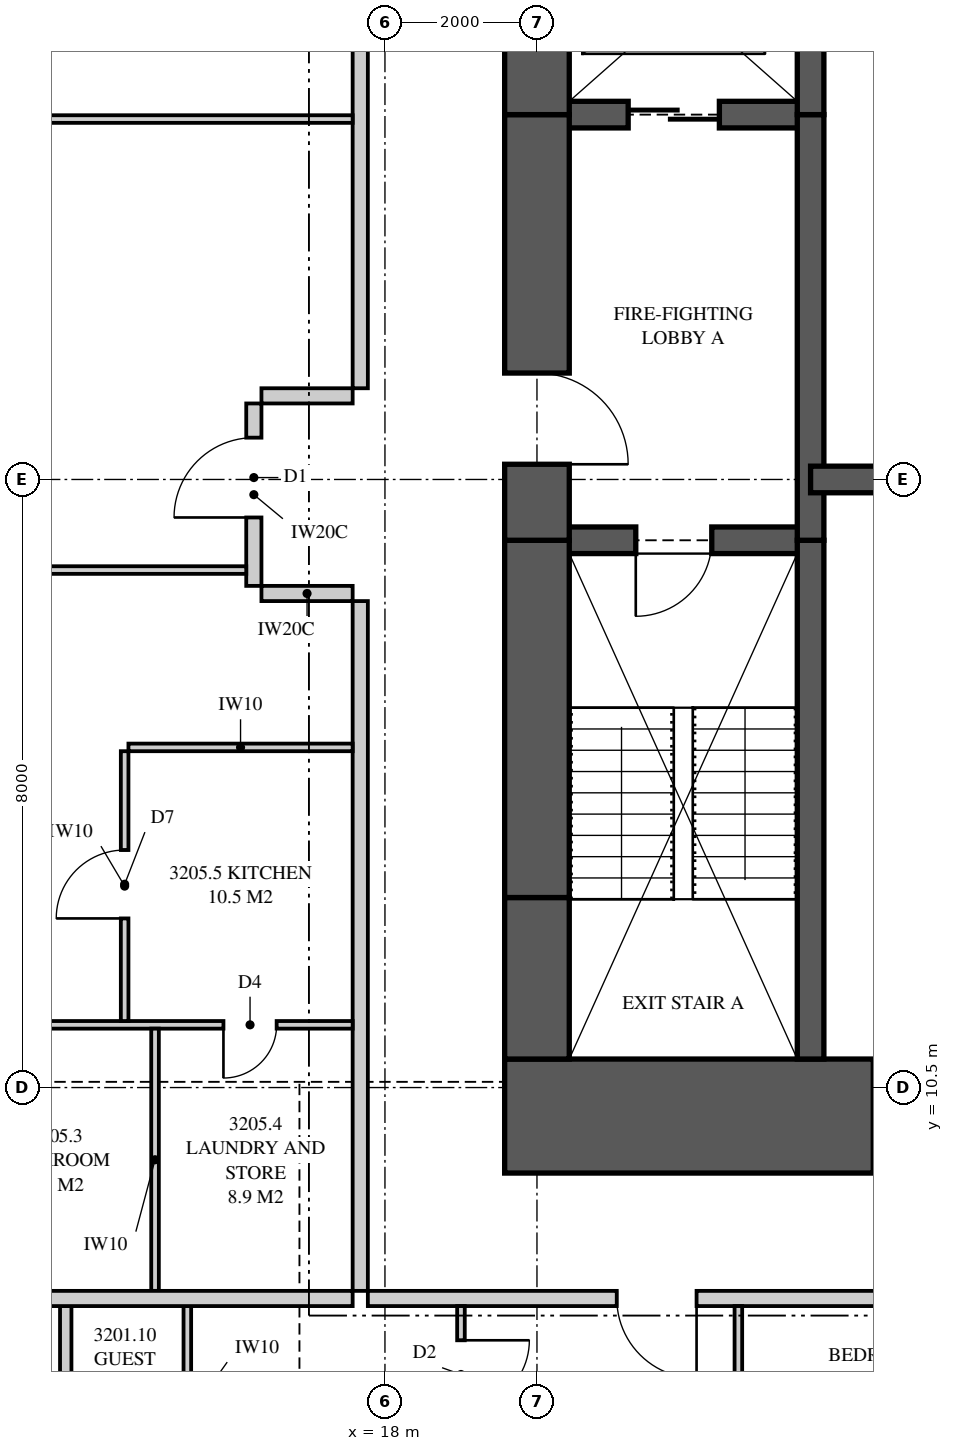
"""IFC4 building model, lengths in metres.
Left out: names, types, materials, properties, quantities, classifications, styles, units other than length and angle.
Written with IfcOpenShell. Run it as: python <this file> out.ifc"""

import sys

from ifc_helpers import new_model, si_unit, direction, frame, frame_2d, origin, place, context, subcontext, project, spatial, polyline, rectangle, outline, extrude, element, fill, save


model = new_model("IFC4")
c1 = context("Model", 3, precision=1e-05, world=origin(), true_north=direction((0.0, 1.0)))
c2 = subcontext(c1, "Body", "Model", "MODEL_VIEW")
j1 = project(units=[si_unit("LENGTHUNIT", "METRE"), si_unit("PLANEANGLEUNIT", "RADIAN")], contexts=[c1])
p1 = place(None, origin())
s1 = spatial("IfcSite", under=j1, at=p1, CompositionType="ELEMENT")
p2 = place(p1, origin())
s2 = spatial("IfcBuilding", under=s1, at=p2, CompositionType="ELEMENT")
p3 = place(p2, frame((0.0, 0.0, 118.25)))
s3 = spatial("IfcBuildingStorey", under=s2, at=p3, CompositionType="ELEMENT", Elevation=118.25)
p4 = place(p3, frame((19.575, 10.125, 0.0), z_axis=(0.0, 0.0, 1.0), x_axis=(1.0, 0.0, 0.0)))
e1 = element("IfcWall", 1, at=p4, inside=s3, PredefinedType="SHEAR", context=c2, shape_type="SweptSolid", body=[
    extrude(rectangle(XDim=6.425, YDim=1.5, at=frame_2d((3.212, 0.0))), origin(), (0.0, 0.0, 1.0), 3.35),
])
p5 = place(p4, frame((4.85, 0.0, 0.0)))
e2 = element("IfcOpeningElement", 2, at=p5, cuts=e1, PredefinedType="OPENING", context=c2, shape_type="SweptSolid", body=[
    extrude(rectangle(XDim=0.75, YDim=2.1, at=frame_2d((0.375, 1.05))), frame((0.0, 0.76, 0.0), z_axis=(0.0, -1.0, 0.0), x_axis=(1.0, 0.0, 0.0)), (0.0, 0.0, 1.0), 1.52),
])
p6 = place(p3, frame((20.0, 26.125, 0.0), z_axis=(0.0, 0.0, 1.0), x_axis=(0.0, -1.0, 0.0)))
e3 = element("IfcWall", 3, at=p6, inside=s3, PredefinedType="SHEAR", context=c2, shape_type="SweptSolid", body=[
    extrude(rectangle(XDim=2.825, YDim=0.85, at=frame_2d((1.413, 0.0))), origin(), (0.0, 0.0, 1.0), 3.35),
])
p7 = place(p3, frame((20.0, 23.3, 0.0), z_axis=(0.0, 0.0, 1.0), x_axis=(0.0, -1.0, 0.0)))
e4 = element("IfcWall", 4, at=p7, inside=s3, PredefinedType="SHEAR", context=c2, shape_type="SweptSolid", body=[
    extrude(rectangle(XDim=5.6, YDim=0.85, at=frame_2d((2.8, 0.0))), origin(), (0.0, 0.0, 1.0), 3.35),
])
p8 = place(p7, frame((3.4, 0.0, 0.0)))
e5 = element("IfcOpeningElement", 5, at=p8, cuts=e4, PredefinedType="OPENING", context=c2, shape_type="SweptSolid", body=[
    extrude(rectangle(XDim=1.2, YDim=2.2, at=frame_2d((0.6, 1.1))), frame((0.0, 0.435, 0.0), z_axis=(0.0, -1.0, 0.0), x_axis=(1.0, 0.0, 0.0)), (0.0, 0.0, 1.0), 0.87),
])
p9 = place(p3, frame((20.0, 17.7, 0.0), z_axis=(0.0, 0.0, 1.0), x_axis=(0.0, -1.0, 0.0)))
e6 = element("IfcWall", 6, at=p9, inside=s3, PredefinedType="SHEAR", context=c2, shape_type="SweptSolid", body=[
    extrude(rectangle(XDim=4.7, YDim=0.85, at=frame_2d((2.35, 0.0))), origin(), (0.0, 0.0, 1.0), 3.35),
])
p10 = place(p3, frame((20.0, 13.0, 0.0), z_axis=(0.0, 0.0, 1.0), x_axis=(0.0, -1.0, 0.0)))
e7 = element("IfcWall", 7, at=p10, inside=s3, PredefinedType="SHEAR", context=c2, shape_type="SweptSolid", body=[
    extrude(rectangle(XDim=2.125, YDim=0.85, at=frame_2d((1.062, 0.0))), origin(), (0.0, 0.0, 1.0), 3.35),
])
p11 = place(p3, frame((23.6, 10.875, 0.0), z_axis=(0.0, 0.0, 1.0), x_axis=(0.0, 1.0, 0.0)))
e8 = element("IfcWall", 8, at=p11, inside=s3, PredefinedType="SHEAR", context=c2, shape_type="SweptSolid", body=[
    extrude(rectangle(XDim=6.825, YDim=0.35, at=frame_2d((3.413, 0.0))), origin(), (0.0, 0.0, 1.0), 3.35),
])
p12 = place(p3, frame((23.6, 17.7, 0.0), z_axis=(0.0, 0.0, 1.0), x_axis=(0.0, 1.0, 0.0)))
e9 = element("IfcWall", 9, at=p12, inside=s3, PredefinedType="SHEAR", context=c2, shape_type="SweptSolid", body=[
    extrude(rectangle(XDim=5.6, YDim=0.35, at=frame_2d((2.8, 0.0))), origin(), (0.0, 0.0, 1.0), 3.35),
])
p13 = place(p3, frame((23.6, 23.3, 0.0), z_axis=(0.0, 0.0, 1.0), x_axis=(0.0, 1.0, 0.0)))
e10 = element("IfcWall", 10, at=p13, inside=s3, PredefinedType="SHEAR", context=c2, shape_type="SweptSolid", body=[
    extrude(rectangle(XDim=2.825, YDim=0.35, at=frame_2d((1.413, 0.0))), origin(), (0.0, 0.0, 1.0), 3.35),
])
p14 = place(p3, frame((20.0, 17.7, 0.0), z_axis=(0.0, 0.0, 1.0), x_axis=(1.0, 0.0, 0.0)))
e11 = element("IfcWall", 11, at=p14, inside=s3, PredefinedType="SHEAR", context=c2, shape_type="SweptSolid", body=[
    extrude(rectangle(XDim=3.6, YDim=0.35, at=frame_2d((1.8, 0.0))), origin(), (0.0, 0.0, 1.0), 3.35),
])
p15 = place(p14, frame((1.3, 0.0, 0.0)))
e12 = element("IfcOpeningElement", 12, at=p15, cuts=e11, PredefinedType="OPENING", context=c2, shape_type="SweptSolid", body=[
    extrude(rectangle(XDim=1.0, YDim=2.1, at=frame_2d((0.5, 1.05))), frame((0.0, 0.185, 0.0), z_axis=(0.0, -1.0, 0.0), x_axis=(1.0, 0.0, 0.0)), (0.0, 0.0, 1.0), 0.37),
])
p16 = place(p3, frame((20.0, 23.3, 0.0), z_axis=(0.0, 0.0, 1.0), x_axis=(1.0, 0.0, 0.0)))
e13 = element("IfcWall", 13, at=p16, inside=s3, PredefinedType="SHEAR", context=c2, shape_type="SweptSolid", body=[
    extrude(rectangle(XDim=3.6, YDim=0.35, at=frame_2d((1.8, 0.0))), origin(), (0.0, 0.0, 1.0), 3.35),
])
p17 = place(p16, frame((1.2, 0.0, 0.0)))
e14 = element("IfcOpeningElement", 14, at=p17, cuts=e13, PredefinedType="OPENING", context=c2, shape_type="SweptSolid", body=[
    extrude(rectangle(XDim=1.2, YDim=2.1, at=frame_2d((0.6, 1.05))), frame((0.0, 0.185, 0.0), z_axis=(0.0, -1.0, 0.0), x_axis=(1.0, 0.0, 0.0)), (0.0, 0.0, 1.0), 0.37),
])
p18 = place(p3, frame((23.6, 18.5, 0.0), z_axis=(0.0, 0.0, 1.0), x_axis=(1.0, 0.0, 0.0)))
e15 = element("IfcWall", 15, at=p18, inside=s3, PredefinedType="SHEAR", context=c2, shape_type="SweptSolid", body=[
    extrude(rectangle(XDim=2.4, YDim=0.35, at=frame_2d((1.2, 0.0))), origin(), (0.0, 0.0, 1.0), 3.35),
])
p19 = place(p3, frame((17.775, 7.725, 0.0), z_axis=(0.0, 0.0, 1.0), x_axis=(1.0, 0.0, 0.0)))
e16 = element("IfcWall", 16, at=p19, inside=s3, PredefinedType="PARTITIONING", context=c2, shape_type="SweptSolid", body=[
    extrude(outline(polyline([(0.0, 0.0), (19.225, 0.0), (19.225, 3.11), (10.312, 3.11), (10.312, 2.541), (9.638, 2.541), (9.638, 3.11), (0.0, 3.11), (0.0, 0.0)])), frame((0.0, 0.1, 0.0), z_axis=(0.0, -1.0, 0.0), x_axis=(1.0, 0.0, 0.0)), (0.0, 0.0, 1.0), 0.2),
])
p20 = place(p19, frame((3.275, 0.0, 0.0)))
e17 = element("IfcOpeningElement", 17, at=p20, cuts=e16, PredefinedType="OPENING", context=c2, shape_type="SweptSolid", body=[
    extrude(rectangle(XDim=1.05, YDim=2.2, at=frame_2d((0.525, 1.1))), frame((0.0, 0.11, 0.0), z_axis=(0.0, -1.0, 0.0), x_axis=(1.0, 0.0, 0.0)), (0.0, 0.0, 1.0), 0.22),
])
p21 = place(p3, frame((22.65, 0.175, 0.0), z_axis=(0.0, 0.0, 1.0), x_axis=(0.0, 1.0, 0.0)))
e18 = element("IfcWall", 18, at=p21, inside=s3, PredefinedType="PARTITIONING", context=c2, shape_type="SweptSolid", body=[
    extrude(outline(polyline([(0.0, 0.0), (7.45, 0.0), (7.45, 3.11), (1.635, 3.11), (1.635, 2.15), (0.0, 2.15), (0.0, 3.11), (0.0, 0.0)])), frame((0.0, 0.05, 0.0), z_axis=(0.0, -1.0, 0.0), x_axis=(1.0, 0.0, 0.0)), (0.0, 0.0, 1.0), 0.1),
])
p22 = place(p21, frame((3.6, 0.0, 0.0)))
e19 = element("IfcOpeningElement", 19, at=p22, cuts=e18, PredefinedType="OPENING", context=c2, shape_type="SweptSolid", body=[
    extrude(rectangle(XDim=0.9, YDim=2.1, at=frame_2d((0.45, 1.05))), frame((0.0, 0.06, 0.0), z_axis=(0.0, -1.0, 0.0), x_axis=(1.0, 0.0, 0.0)), (0.0, 0.0, 1.0), 0.12),
])
p23 = place(p3, frame((19.0, 0.175, 0.0), z_axis=(0.0, 0.0, 1.0), x_axis=(0.0, 1.0, 0.0)))
e20 = element("IfcWall", 20, at=p23, inside=s3, PredefinedType="PARTITIONING", context=c2, shape_type="SweptSolid", body=[
    extrude(outline(polyline([(0.529, 2.15), (0.0, 2.15), (0.0, 0.0), (0.529, 0.0), (0.529, 0.017), (1.021, 0.017), (1.021, 0.0), (7.45, 0.0), (7.45, 3.11), (1.635, 3.11), (1.635, 2.15), (1.021, 2.15), (1.021, 2.133), (0.529, 2.133), (0.529, 2.15)])), frame((0.0, 0.05, 0.0), z_axis=(0.0, -1.0, 0.0), x_axis=(1.0, 0.0, 0.0)), (0.0, 0.0, 1.0), 0.1),
])
p24 = place(p23, frame((6.1, 0.0, 0.0)))
e21 = element("IfcOpeningElement", 21, at=p24, cuts=e20, PredefinedType="OPENING", context=c2, shape_type="SweptSolid", body=[
    extrude(rectangle(XDim=0.9, YDim=2.1, at=frame_2d((0.45, 1.05))), frame((0.0, 0.06, 0.0), z_axis=(0.0, -1.0, 0.0), x_axis=(1.0, 0.0, 0.0)), (0.0, 0.0, 1.0), 0.12),
])
p25 = place(p3, frame((15.4, 4.675, 0.0), z_axis=(0.0, 0.0, 1.0), x_axis=(0.0, 1.0, 0.0)))
e22 = element("IfcWall", 22, at=p25, inside=s3, PredefinedType="PARTITIONING", context=c2, shape_type="SweptSolid", body=[
    extrude(rectangle(XDim=2.95, YDim=0.1, at=frame_2d((1.475, 0.0))), origin(), (0.0, 0.0, 1.0), 3.11),
])
p26 = place(p3, frame((13.8, 5.5, 0.0), z_axis=(0.0, 0.0, 1.0), x_axis=(0.0, 1.0, 0.0)))
e23 = element("IfcWall", 23, at=p26, inside=s3, PredefinedType="PLUMBINGWALL", context=c2, shape_type="SweptSolid", body=[
    extrude(rectangle(XDim=2.125, YDim=0.15, at=frame_2d((1.062, 0.0))), origin(), (0.0, 0.0, 1.0), 3.11),
])
p27 = place(p3, frame((6.0, 7.725, 0.0), z_axis=(0.0, 0.0, 1.0), x_axis=(1.0, 0.0, 0.0)))
e24 = element("IfcWall", 24, at=p27, inside=s3, PredefinedType="PARTITIONING", context=c2, shape_type="SweptSolid", body=[
    extrude(outline(polyline([(0.0, 0.0), (11.575, 0.0), (11.575, 3.11), (11.212, 3.11), (11.212, 2.541), (10.538, 2.541), (10.538, 3.11), (5.51, 3.11), (5.51, 2.51), (2.969, 2.51), (2.969, 2.541), (2.727, 2.541), (2.727, 2.15), (0.884, 2.15), (0.884, 3.11), (0.0, 3.11), (0.0, 0.0)])), frame((0.0, 0.1, 0.0), z_axis=(0.0, -1.0, 0.0), x_axis=(1.0, 0.0, 0.0)), (0.0, 0.0, 1.0), 0.2),
])
p28 = place(p3, frame((17.675, 7.825, 0.0), z_axis=(0.0, 0.0, 1.0), x_axis=(0.0, 1.0, 0.0)))
e25 = element("IfcWall", 25, at=p28, inside=s3, PredefinedType="PARTITIONING", context=c2, shape_type="SweptSolid", body=[
    extrude(outline(polyline([(0.0, 0.0), (9.075, 0.0), (9.075, 3.11), (3.087, 3.11), (3.087, 2.541), (2.413, 2.541), (2.413, 3.11), (0.0, 3.11), (0.0, 0.0)])), frame((0.0, 0.1, 0.0), z_axis=(0.0, -1.0, 0.0), x_axis=(1.0, 0.0, 0.0)), (0.0, 0.0, 1.0), 0.2),
])
p29 = place(p3, frame((6.175, 11.325, 0.0), z_axis=(0.0, 0.0, 1.0), x_axis=(1.0, 0.0, 0.0)))
e26 = element("IfcWall", 26, at=p29, inside=s3, PredefinedType="PARTITIONING", context=c2, shape_type="SweptSolid", body=[
    extrude(outline(polyline([(0.175, 3.11), (0.0, 3.11), (0.0, 0.0), (0.529, 0.0), (0.529, 0.325), (1.021, 0.325), (1.021, 0.0), (11.4, 0.0), (11.4, 3.11), (5.285, 3.11), (5.285, 2.51), (2.765, 2.51), (2.765, 3.11), (2.744, 3.11), (2.744, 2.541), (2.169, 2.541), (2.169, 3.11), (1.918, 3.11), (1.918, 2.15), (1.021, 2.15), (1.021, 1.825), (0.529, 1.825), (0.529, 2.15), (0.175, 2.15), (0.175, 3.11)])), frame((0.0, 0.05, 0.0), z_axis=(0.0, -1.0, 0.0), x_axis=(1.0, 0.0, 0.0)), (0.0, 0.0, 1.0), 0.1),
])
p30 = place(p29, frame((4.85, 0.0, 0.0)))
e27 = element("IfcOpeningElement", 27, at=p30, cuts=e26, PredefinedType="OPENING", context=c2, shape_type="SweptSolid", body=[
    extrude(rectangle(XDim=0.9, YDim=2.1, at=frame_2d((0.45, 1.05))), frame((0.0, 0.06, 0.0), z_axis=(0.0, -1.0, 0.0), x_axis=(1.0, 0.0, 0.0)), (0.0, 0.0, 1.0), 0.12),
])
p31 = place(p29, frame((6.25, 0.0, 0.0)))
e28 = element("IfcOpeningElement", 28, at=p31, cuts=e26, PredefinedType="OPENING", context=c2, shape_type="SweptSolid", body=[
    extrude(rectangle(XDim=0.9, YDim=2.1, at=frame_2d((0.45, 1.05))), frame((0.0, 0.06, 0.0), z_axis=(0.0, -1.0, 0.0), x_axis=(1.0, 0.0, 0.0)), (0.0, 0.0, 1.0), 0.12),
])
p32 = place(p29, frame((9.7, 0.0, 0.0)))
e29 = element("IfcOpeningElement", 29, at=p32, cuts=e26, PredefinedType="OPENING", context=c2, shape_type="SweptSolid", body=[
    extrude(rectangle(XDim=0.7, YDim=2.1, at=frame_2d((0.35, 1.05))), frame((0.0, 0.06, 0.0), z_axis=(0.0, -1.0, 0.0), x_axis=(1.0, 0.0, 0.0)), (0.0, 0.0, 1.0), 0.12),
])
p33 = place(p3, frame((14.975, 7.825, 0.0), z_axis=(0.0, 0.0, 1.0), x_axis=(0.0, 1.0, 0.0)))
e30 = element("IfcWall", 30, at=p33, inside=s3, PredefinedType="PARTITIONING", context=c2, shape_type="SweptSolid", body=[
    extrude(outline(polyline([(0.0, 0.0), (3.45, 0.0), (3.45, 3.11), (3.037, 3.11), (3.037, 2.541), (2.463, 2.541), (2.463, 3.11), (0.0, 3.11), (0.0, 0.0)])), frame((0.0, 0.05, 0.0), z_axis=(0.0, -1.0, 0.0), x_axis=(1.0, 0.0, 0.0)), (0.0, 0.0, 1.0), 0.1),
])
p34 = place(p3, frame((14.575, 11.375, 0.0), z_axis=(0.0, 0.0, 1.0), x_axis=(0.0, 1.0, 0.0)))
e31 = element("IfcWall", 31, at=p34, inside=s3, PredefinedType="PARTITIONING", context=c2, shape_type="SweptSolid", body=[
    extrude(rectangle(XDim=3.55, YDim=0.1, at=frame_2d((1.775, 0.0))), origin(), (0.0, 0.0, 1.0), 3.11),
])
p35 = place(p34, frame((1.35, 0.0, 0.0)))
e32 = element("IfcOpeningElement", 32, at=p35, cuts=e31, PredefinedType="OPENING", context=c2, shape_type="SweptSolid", body=[
    extrude(rectangle(XDim=0.9, YDim=2.1, at=frame_2d((0.45, 1.05))), frame((0.0, 0.06, 0.0), z_axis=(0.0, -1.0, 0.0), x_axis=(1.0, 0.0, 0.0)), (0.0, 0.0, 1.0), 0.12),
])
p36 = place(p3, frame((14.625, 14.975, 0.0), z_axis=(0.0, 0.0, 1.0), x_axis=(1.0, 0.0, 0.0)))
e33 = element("IfcWall", 33, at=p36, inside=s3, PredefinedType="PARTITIONING", context=c2, shape_type="SweptSolid", body=[
    extrude(rectangle(XDim=2.95, YDim=0.1, at=frame_2d((1.475, 0.0))), origin(), (0.0, 0.0, 1.0), 3.11),
])
p37 = place(p3, frame((6.175, 17.308, 0.0), z_axis=(0.0, 0.0, 1.0), x_axis=(1.0, 0.0, 0.0)))
e34 = element("IfcWall", 34, at=p37, inside=s3, PredefinedType="PARTITIONING", context=c2, shape_type="SweptSolid", body=[
    extrude(outline(polyline([(0.0, 0.0), (10.0, 0.0), (10.0, 3.11), (5.285, 3.11), (5.285, 2.51), (2.765, 2.51), (2.765, 3.11), (1.635, 3.11), (1.635, 2.15), (0.0, 2.15), (0.0, 3.11), (0.0, 0.0)])), frame((0.0, 0.05, 0.0), z_axis=(0.0, -1.0, 0.0), x_axis=(1.0, 0.0, 0.0)), (0.0, 0.0, 1.0), 0.1),
])
p38 = place(p37, frame((5.2, 0.0, 0.0)))
e35 = element("IfcOpeningElement", 35, at=p38, cuts=e34, PredefinedType="OPENING", context=c2, shape_type="SweptSolid", body=[
    extrude(rectangle(XDim=1.0, YDim=2.1, at=frame_2d((0.5, 1.05))), frame((0.0, 0.06, 0.0), z_axis=(0.0, -1.0, 0.0), x_axis=(1.0, 0.0, 0.0)), (0.0, 0.0, 1.0), 0.12),
])
p39 = place(p3, frame((6.175, 23.242, 0.0), z_axis=(0.0, 0.0, 1.0), x_axis=(1.0, 0.0, 0.0)))
e36 = element("IfcWall", 36, at=p39, inside=s3, PredefinedType="PARTITIONING", context=c2, shape_type="SweptSolid", body=[
    extrude(outline(polyline([(0.529, 2.15), (0.0, 2.15), (0.0, 0.0), (0.529, 0.0), (0.529, 0.268), (1.021, 0.268), (1.021, 0.0), (11.4, 0.0), (11.4, 3.11), (5.285, 3.11), (5.285, 2.51), (2.765, 2.51), (2.765, 3.11), (1.635, 3.11), (1.635, 2.15), (1.021, 2.15), (1.021, 1.882), (0.529, 1.882), (0.529, 2.15)])), frame((0.0, 0.05, 0.0), z_axis=(0.0, -1.0, 0.0), x_axis=(1.0, 0.0, 0.0)), (0.0, 0.0, 1.0), 0.1),
])
p40 = place(p39, frame((2.55, 0.0, 0.0)))
e37 = element("IfcOpeningElement", 37, at=p40, cuts=e36, PredefinedType="OPENING", context=c2, shape_type="SweptSolid", body=[
    extrude(rectangle(XDim=1.0, YDim=2.1, at=frame_2d((0.5, 1.05))), frame((0.0, 0.06, 0.0), z_axis=(0.0, -1.0, 0.0), x_axis=(1.0, 0.0, 0.0)), (0.0, 0.0, 1.0), 0.12),
])
p41 = place(p3, frame((17.675, 19.7, 0.0), z_axis=(0.0, 0.0, 1.0), x_axis=(0.0, 1.0, 0.0)))
e38 = element("IfcWall", 38, at=p41, inside=s3, PredefinedType="PARTITIONING", context=c2, shape_type="SweptSolid", body=[
    extrude(outline(polyline([(0.0, 0.0), (9.475, 0.0), (9.475, 3.11), (7.062, 3.11), (7.062, 2.541), (6.388, 2.541), (6.388, 3.11), (0.0, 3.11), (0.0, 0.0)])), frame((0.0, 0.1, 0.0), z_axis=(0.0, -1.0, 0.0), x_axis=(1.0, 0.0, 0.0)), (0.0, 0.0, 1.0), 0.2),
])
p42 = place(p3, frame((16.275, 17.1, 0.0), z_axis=(0.0, 0.0, 1.0), x_axis=(0.0, 1.0, 0.0)))
e39 = element("IfcWall", 39, at=p42, inside=s3, PredefinedType="PARTITIONING", context=c2, shape_type="SweptSolid", body=[
    extrude(rectangle(XDim=2.4, YDim=0.2, at=frame_2d((1.2, 0.0))), origin(), (0.0, 0.0, 1.0), 3.11),
])
p43 = place(p42, frame((0.9, 0.0, 0.0)))
e40 = element("IfcOpeningElement", 40, at=p43, cuts=e39, PredefinedType="OPENING", context=c2, shape_type="SweptSolid", body=[
    extrude(rectangle(XDim=1.05, YDim=2.2, at=frame_2d((0.525, 1.1))), frame((0.0, 0.11, 0.0), z_axis=(0.0, -1.0, 0.0), x_axis=(1.0, 0.0, 0.0)), (0.0, 0.0, 1.0), 0.22),
])
for number, where, z_axis, x_axis in (
    (41, (17.575, 17.0, 0.0), (0.0, 0.0, 1.0), (-1.0, 0.0, 0.0)),
    (42, (17.575, 19.6, 0.0), (0.0, 0.0, 1.0), (-1.0, 0.0, 0.0)),
):
    element("IfcWall", number, at=place(p3, frame(where, z_axis=z_axis, x_axis=x_axis)), inside=s3, PredefinedType="PARTITIONING", context=c2, shape_type="SweptSolid", body=[
        extrude(rectangle(XDim=1.2, YDim=0.2, at=frame_2d((0.6, 0.0))), origin(), (0.0, 0.0, 1.0), 3.11),
    ])
p44 = place(p20, frame((1.05, 0.0, 0.0), z_axis=(0.0, 0.0, 1.0), x_axis=(-1.0, 0.0, 0.0)))
e43 = element("IfcDoor", 43, at=p44, inside=s3, OperationType="SINGLE_SWING_LEFT", PredefinedType="DOOR", context=c2, shape_type="SweptSolid", body=[
    extrude(rectangle(XDim=1.05, YDim=2.2, at=frame_2d((0.525, 1.1))), frame((0.0, 0.025, 0.0), z_axis=(0.0, -1.0, 0.0), x_axis=(1.0, 0.0, 0.0)), (0.0, 0.0, 1.0), 0.05),
])
fill(e17, e43)
p45 = place(p24, frame((0.9, 0.0, 0.0), z_axis=(0.0, 0.0, 1.0), x_axis=(-1.0, 0.0, 0.0)))
e44 = element("IfcDoor", 44, at=p45, inside=s3, OperationType="SINGLE_SWING_LEFT", PredefinedType="DOOR", context=c2, shape_type="SweptSolid", body=[
    extrude(rectangle(XDim=0.9, YDim=2.1, at=frame_2d((0.45, 1.05))), frame((0.0, 0.025, 0.0), z_axis=(0.0, -1.0, 0.0), x_axis=(1.0, 0.0, 0.0)), (0.0, 0.0, 1.0), 0.05),
])
fill(e21, e44)
p46 = place(p43, origin())
e45 = element("IfcDoor", 45, at=p46, inside=s3, OperationType="SINGLE_SWING_LEFT", PredefinedType="DOOR", context=c2, shape_type="SweptSolid", body=[
    extrude(rectangle(XDim=1.05, YDim=2.2, at=frame_2d((0.525, 1.1))), frame((0.0, 0.025, 0.0), z_axis=(0.0, -1.0, 0.0), x_axis=(1.0, 0.0, 0.0)), (0.0, 0.0, 1.0), 0.05),
])
fill(e40, e45)
p47 = place(p32, frame((0.7, 0.0, 0.0), z_axis=(0.0, 0.0, 1.0), x_axis=(-1.0, 0.0, 0.0)))
e46 = element("IfcDoor", 46, at=p47, inside=s3, OperationType="SINGLE_SWING_RIGHT", PredefinedType="DOOR", context=c2, shape_type="SweptSolid", body=[
    extrude(rectangle(XDim=0.7, YDim=2.1, at=frame_2d((0.35, 1.05))), frame((0.0, 0.025, 0.0), z_axis=(0.0, -1.0, 0.0), x_axis=(1.0, 0.0, 0.0)), (0.0, 0.0, 1.0), 0.05),
])
fill(e29, e46)
p48 = place(p35, origin())
e47 = element("IfcDoor", 47, at=p48, inside=s3, OperationType="SINGLE_SWING_LEFT", PredefinedType="DOOR", context=c2, shape_type="SweptSolid", body=[
    extrude(rectangle(XDim=0.9, YDim=2.1, at=frame_2d((0.45, 1.05))), frame((0.0, 0.025, 0.0), z_axis=(0.0, -1.0, 0.0), x_axis=(1.0, 0.0, 0.0)), (0.0, 0.0, 1.0), 0.05),
])
fill(e32, e47)
p49 = place(p15, frame((1.0, 0.0, 0.0), z_axis=(0.0, 0.0, 1.0), x_axis=(-1.0, 0.0, 0.0)))
e48 = element("IfcDoor", 48, at=p49, inside=s3, OperationType="SINGLE_SWING_RIGHT", PredefinedType="DOOR", context=c2, shape_type="SweptSolid", body=[
    extrude(rectangle(XDim=1.0, YDim=2.1, at=frame_2d((0.5, 1.05))), frame((0.0, 0.025, 0.0), z_axis=(0.0, -1.0, 0.0), x_axis=(1.0, 0.0, 0.0)), (0.0, 0.0, 1.0), 0.05),
])
fill(e12, e48)
p50 = place(p8, origin())
e49 = element("IfcDoor", 49, at=p50, inside=s3, OperationType="SINGLE_SWING_RIGHT", PredefinedType="DOOR", context=c2, shape_type="SweptSolid", body=[
    extrude(rectangle(XDim=1.2, YDim=2.2, at=frame_2d((0.6, 1.1))), frame((0.0, 0.025, 0.0), z_axis=(0.0, -1.0, 0.0), x_axis=(1.0, 0.0, 0.0)), (0.0, 0.0, 1.0), 0.05),
])
fill(e5, e49)
p51 = place(p17, origin())
e50 = element("IfcDoor", 50, at=p51, inside=s3, OperationType="SLIDING_TO_LEFT", PredefinedType="DOOR", context=c2, shape_type="SweptSolid", body=[
    extrude(rectangle(XDim=1.2, YDim=2.1, at=frame_2d((0.6, 1.05))), frame((0.0, 0.025, 0.0), z_axis=(0.0, -1.0, 0.0), x_axis=(1.0, 0.0, 0.0)), (0.0, 0.0, 1.0), 0.05),
])
fill(e14, e50)
save(model, sys.argv[1])
